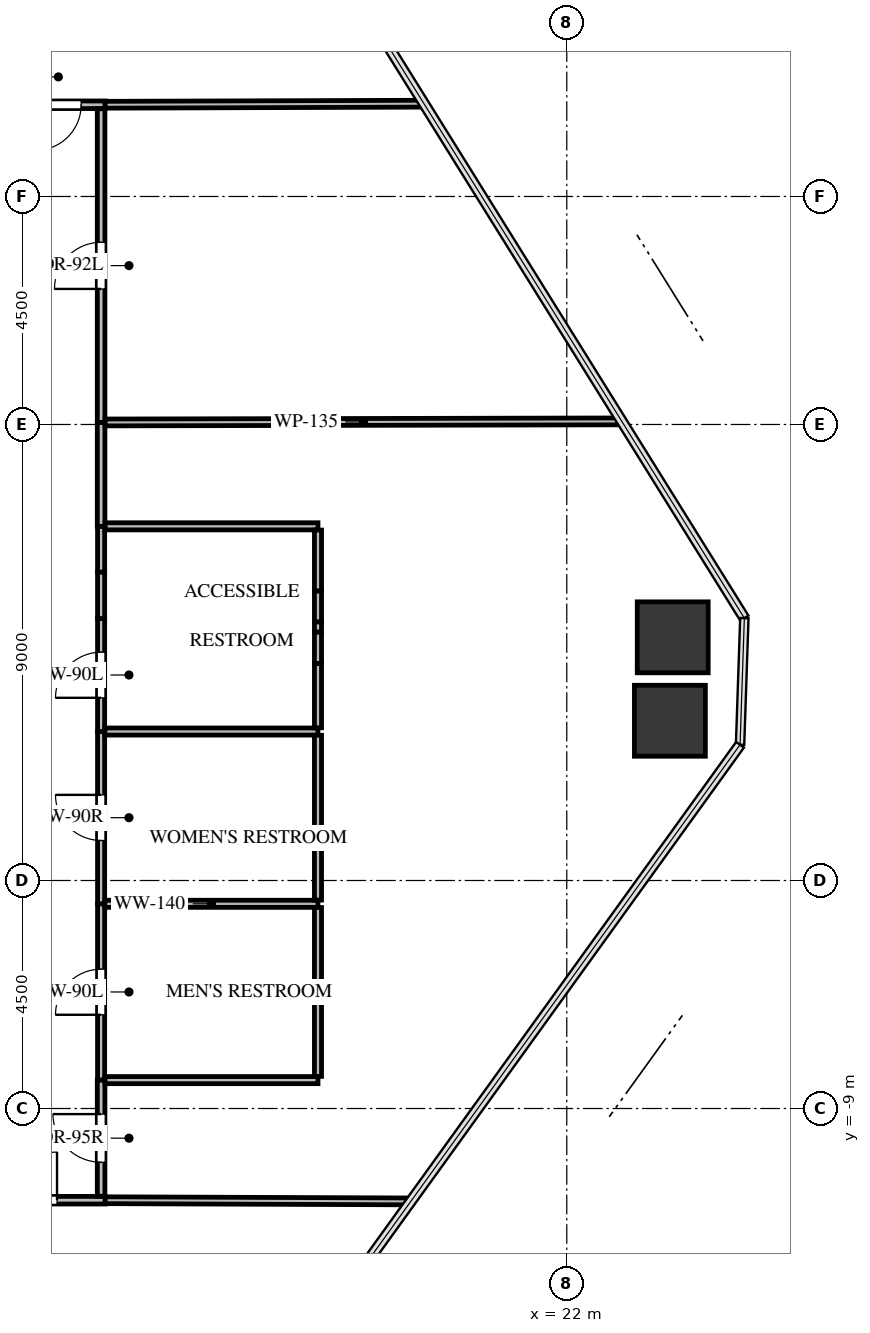
"""IFC4 building model, lengths in metres.
Left out: names, types, materials, properties, quantities, classifications, styles, units other than length and angle.
Written with IfcOpenShell. Run it as: python <this file> out.ifc"""

import sys

from ifc_helpers import new_model, si_unit, direction, frame, frame_2d, origin, origin_2d, place, context, subcontext, project, spatial, rectangle, extrude, source, transform, mapped, element, fill, save


model = new_model("IFC4")
c1 = context("Model", 3, precision=1e-05, world=origin(), true_north=direction((0.0, 1.0)))
c2 = subcontext(c1, "Body", "Model", "MODEL_VIEW")
j1 = project(units=[si_unit("LENGTHUNIT", "METRE"), si_unit("PLANEANGLEUNIT", "RADIAN")], contexts=[c1])
p1 = place(None, origin())
s1 = spatial("IfcSite", under=j1, at=p1, CompositionType="ELEMENT")
p2 = place(p1, origin())
s2 = spatial("IfcBuilding", under=s1, at=p2, CompositionType="ELEMENT")
p3 = place(p2, frame((0.0, 0.0, 42.3)))
s3 = spatial("IfcBuildingStorey", under=s2, at=p3, CompositionType="ELEMENT", Elevation=42.3)
m1 = source(origin(), c2, "Body", "SweptSolid", [
    extrude(rectangle(XDim=1.4, YDim=1.4, at=origin_2d()), origin(), (0.0, 0.0, 1.0), 3.3),
])
for number, where, z_axis, x_axis in (
    (1, (24.091, 0.3, -0.24), (0.0, 0.0, 1.0), (1.0, 0.0, 0.0)),
    (2, (24.035, -1.347, -0.24), (0.0, 0.0, 1.0), (1.0, 0.0, 0.0)),
):
    element("IfcColumn", number, at=place(p3, frame(where, z_axis=z_axis, x_axis=x_axis)), inside=s3, PredefinedType="COLUMN", context=c2, shape_type="MappedRepresentation", body=[
        mapped(m1, transform((0.0, 0.0, 0.0), x_axis=(1.0, 0.0, 0.0), y_axis=(0.0, 1.0, 0.0), z_axis=(0.0, 0.0, 1.0), scale=1.0)),
    ])
p4 = place(p3, frame((12.81, -8.44, 0.0), z_axis=(0.0, 0.0, 1.0), x_axis=(0.0, 1.0, 0.0)))
e3 = element("IfcWall", 3, at=p4, inside=s3, PredefinedType="PARTITIONING", context=c2, shape_type="SweptSolid", body=[
    extrude(rectangle(XDim=3.48, YDim=0.14, at=frame_2d((1.74, 0.0))), origin(), (0.0, 0.0, 1.0), 3.045),
])
p5 = place(p4, frame((1.29, 0.0, 0.0)))
e4 = element("IfcOpeningElement", 4, at=p5, cuts=e3, PredefinedType="OPENING", context=c2, shape_type="SweptSolid", body=[
    extrude(rectangle(XDim=0.9, YDim=2.05, at=frame_2d((0.45, 1.025))), frame((0.0, 0.08, 0.0), z_axis=(0.0, -1.0, 0.0), x_axis=(1.0, 0.0, 0.0)), (0.0, 0.0, 1.0), 0.16),
])
p6 = place(p3, frame((12.81, -4.96, 0.0), z_axis=(0.0, 0.0, 1.0), x_axis=(0.0, 1.0, 0.0)))
e5 = element("IfcWall", 5, at=p6, inside=s3, PredefinedType="PARTITIONING", context=c2, shape_type="SweptSolid", body=[
    extrude(rectangle(XDim=3.4, YDim=0.14, at=frame_2d((1.7, 0.0))), origin(), (0.0, 0.0, 1.0), 3.045),
])
p7 = place(p6, frame((1.25, 0.0, 0.0)))
e6 = element("IfcOpeningElement", 6, at=p7, cuts=e5, PredefinedType="OPENING", context=c2, shape_type="SweptSolid", body=[
    extrude(rectangle(XDim=0.9, YDim=2.05, at=frame_2d((0.45, 1.025))), frame((0.0, 0.08, 0.0), z_axis=(0.0, -1.0, 0.0), x_axis=(1.0, 0.0, 0.0)), (0.0, 0.0, 1.0), 0.16),
])
p8 = place(p3, frame((12.81, -1.56, 0.0), z_axis=(0.0, 0.0, 1.0), x_axis=(0.0, 1.0, 0.0)))
e7 = element("IfcWall", 7, at=p8, inside=s3, PredefinedType="PARTITIONING", context=c2, shape_type="SweptSolid", body=[
    extrude(rectangle(XDim=2.231, YDim=0.14, at=frame_2d((1.116, 0.0))), origin(), (0.0, 0.0, 1.0), 3.045),
])
p9 = place(p8, frame((0.666, 0.0, 0.0)))
e8 = element("IfcOpeningElement", 8, at=p9, cuts=e7, PredefinedType="OPENING", context=c2, shape_type="SweptSolid", body=[
    extrude(rectangle(XDim=0.9, YDim=2.05, at=frame_2d((0.45, 1.025))), frame((0.0, 0.08, 0.0), z_axis=(0.0, -1.0, 0.0), x_axis=(1.0, 0.0, 0.0)), (0.0, 0.0, 1.0), 0.16),
])
p10 = place(p3, frame((12.81, 1.585, 0.0), z_axis=(0.0, 0.0, 1.0), x_axis=(0.0, 1.0, 0.0)))
e9 = element("IfcWall", 9, at=p10, inside=s3, PredefinedType="PARTITIONING", context=c2, shape_type="SweptSolid", body=[
    extrude(rectangle(XDim=0.905, YDim=0.14, at=frame_2d((0.453, 0.0))), origin(), (0.0, 0.0, 1.0), 3.045),
])
p11 = place(p3, frame((12.81, 0.671, 0.0), z_axis=(0.0, 0.0, 1.0), x_axis=(0.0, 1.0, 0.0)))
e10 = element("IfcWall", 10, at=p11, inside=s3, PredefinedType="PARTITIONING", context=c2, shape_type="SweptSolid", body=[
    extrude(rectangle(XDim=0.914, YDim=0.14, at=frame_2d((0.457, 0.0))), origin(), (0.0, 0.0, 1.0), 2.13),
])
p12 = place(p3, frame((12.89, 10.81, 0.0), z_axis=(0.0, 0.0, 1.0), x_axis=(-1.0, 0.0, 0.0)))
e11 = element("IfcWall", 11, at=p12, inside=s3, PredefinedType="PARTITIONING", context=c2, shape_type="SweptSolid", body=[
    extrude(rectangle(XDim=1.847, YDim=0.15, at=frame_2d((0.924, 0.0))), origin(), (0.0, 0.0, 1.0), 3.045),
])
p13 = place(p12, frame((0.474, 0.0, 0.0)))
e12 = element("IfcOpeningElement", 12, at=p13, cuts=e11, PredefinedType="OPENING", context=c2, shape_type="SweptSolid", body=[
    extrude(rectangle(XDim=0.9, YDim=2.05, at=frame_2d((0.45, 1.025))), frame((0.0, 0.085, 0.0), z_axis=(0.0, -1.0, 0.0), x_axis=(1.0, 0.0, 0.0)), (0.0, 0.0, 1.0), 0.17),
])
p14 = place(p3, frame((10.04, -10.81, 0.0), z_axis=(0.0, 0.0, 1.0), x_axis=(1.0, 0.0, 0.0)))
e13 = element("IfcWall", 13, at=p14, inside=s3, PredefinedType="PARTITIONING", context=c2, shape_type="SweptSolid", body=[
    extrude(rectangle(XDim=2.85, YDim=0.15, at=frame_2d((1.425, 0.0))), origin(), (0.0, 0.0, 1.0), 3.045),
])
p15 = place(p14, frame((0.95, 0.0, 0.0)))
e14 = element("IfcOpeningElement", 14, at=p15, cuts=e13, PredefinedType="OPENING", context=c2, shape_type="SweptSolid", body=[
    extrude(rectangle(XDim=0.95, YDim=2.1, at=frame_2d((0.475, 1.05))), frame((0.0, 0.085, 0.0), z_axis=(0.0, -1.0, 0.0), x_axis=(1.0, 0.0, 0.0)), (0.0, 0.0, 1.0), 0.17),
])
p16 = place(p3, frame((12.81, -10.731, 0.0), z_axis=(0.0, 0.0, 1.0), x_axis=(0.0, 1.0, 0.0)))
e15 = element("IfcWall", 15, at=p16, inside=s3, PredefinedType="PARTITIONING", context=c2, shape_type="SweptSolid", body=[
    extrude(rectangle(XDim=2.291, YDim=0.15, at=frame_2d((1.146, 0.0))), origin(), (0.0, 0.0, 1.0), 3.045),
])
p17 = place(p16, frame((0.67, 0.0, 0.0)))
e16 = element("IfcOpeningElement", 16, at=p17, cuts=e15, PredefinedType="OPENING", context=c2, shape_type="SweptSolid", body=[
    extrude(rectangle(XDim=0.95, YDim=2.1, at=frame_2d((0.475, 1.05))), frame((0.0, 0.085, 0.0), z_axis=(0.0, -1.0, 0.0), x_axis=(1.0, 0.0, 0.0)), (0.0, 0.0, 1.0), 0.17),
])
p18 = place(p3, frame((12.81, 2.49, 0.0), z_axis=(0.0, 0.0, 1.0), x_axis=(0.0, 1.0, 0.0)))
e17 = element("IfcWall", 17, at=p18, inside=s3, PredefinedType="PARTITIONING", context=c2, shape_type="SweptSolid", body=[
    extrude(rectangle(XDim=2.05, YDim=0.15, at=frame_2d((1.025, 0.0))), origin(), (0.0, 0.0, 1.0), 3.045),
])
p19 = place(p3, frame((12.81, 4.54, 0.0), z_axis=(0.0, 0.0, 1.0), x_axis=(0.0, 1.0, 0.0)))
e18 = element("IfcWall", 18, at=p19, inside=s3, PredefinedType="PARTITIONING", context=c2, shape_type="SweptSolid", body=[
    extrude(rectangle(XDim=6.191, YDim=0.15, at=frame_2d((3.095, 0.0))), origin(), (0.0, 0.0, 1.0), 3.045),
])
p20 = place(p19, frame((2.635, 0.0, 0.0)))
e19 = element("IfcOpeningElement", 19, at=p20, cuts=e18, PredefinedType="OPENING", context=c2, shape_type="SweptSolid", body=[
    extrude(rectangle(XDim=0.92, YDim=2.1, at=frame_2d((0.46, 1.05))), frame((0.0, 0.085, 0.0), z_axis=(0.0, -1.0, 0.0), x_axis=(1.0, 0.0, 0.0)), (0.0, 0.0, 1.0), 0.17),
])
p21 = place(p3, frame((12.884, -4.96, 0.0), z_axis=(0.0, 0.0, 1.0), x_axis=(1.0, 0.0, 0.0)))
e20 = element("IfcWall", 20, at=p21, inside=s3, PredefinedType="PARTITIONING", context=c2, shape_type="SweptSolid", body=[
    extrude(rectangle(XDim=4.206, YDim=0.14, at=frame_2d((2.103, 0.0))), origin(), (0.0, 0.0, 1.0), 3.045),
])
p22 = place(p3, frame((17.09, -8.44, 0.0), z_axis=(0.0, 0.0, 1.0), x_axis=(-1.0, 0.0, 0.0)))
e21 = element("IfcWall", 21, at=p22, inside=s3, PredefinedType="PARTITIONING", context=c2, shape_type="SweptSolid", body=[
    extrude(rectangle(XDim=4.201, YDim=0.14, at=frame_2d((2.101, 0.0))), origin(), (0.0, 0.0, 1.0), 3.045),
])
p23 = place(p3, frame((17.09, -5.034, 0.0), z_axis=(0.0, 0.0, 1.0), x_axis=(0.0, -1.0, 0.0)))
e22 = element("IfcWall", 22, at=p23, inside=s3, PredefinedType="PARTITIONING", context=c2, shape_type="SweptSolid", body=[
    extrude(rectangle(XDim=3.332, YDim=0.14, at=frame_2d((1.666, 0.0))), origin(), (0.0, 0.0, 1.0), 3.045),
])
p24 = place(p3, frame((12.884, -1.56, 0.0), z_axis=(0.0, 0.0, 1.0), x_axis=(1.0, 0.0, 0.0)))
e23 = element("IfcWall", 23, at=p24, inside=s3, PredefinedType="PARTITIONING", context=c2, shape_type="SweptSolid", body=[
    extrude(rectangle(XDim=4.206, YDim=0.14, at=frame_2d((2.103, 0.0))), origin(), (0.0, 0.0, 1.0), 3.045),
])
p25 = place(p3, frame((17.09, -1.634, 0.0), z_axis=(0.0, 0.0, 1.0), x_axis=(0.0, -1.0, 0.0)))
e24 = element("IfcWall", 24, at=p25, inside=s3, PredefinedType="PARTITIONING", context=c2, shape_type="SweptSolid", body=[
    extrude(rectangle(XDim=3.252, YDim=0.14, at=frame_2d((1.626, 0.0))), origin(), (0.0, 0.0, 1.0), 3.045),
])
p26 = place(p3, frame((12.889, 2.49, 0.0), z_axis=(0.0, 0.0, 1.0), x_axis=(1.0, 0.0, 0.0)))
e25 = element("IfcWall", 25, at=p26, inside=s3, PredefinedType="PARTITIONING", context=c2, shape_type="SweptSolid", body=[
    extrude(rectangle(XDim=4.201, YDim=0.14, at=frame_2d((2.101, 0.0))), origin(), (0.0, 0.0, 1.0), 3.045),
])
p27 = place(p3, frame((17.09, 2.416, 0.0), z_axis=(0.0, 0.0, 1.0), x_axis=(0.0, -1.0, 0.0)))
e26 = element("IfcWall", 26, at=p27, inside=s3, PredefinedType="PARTITIONING", context=c2, shape_type="SweptSolid", body=[
    extrude(rectangle(XDim=1.204, YDim=0.14, at=frame_2d((0.602, 0.0))), origin(), (0.0, 0.0, 1.0), 3.045),
])
p28 = place(p3, frame((17.09, 0.606, 0.0), z_axis=(0.0, 0.0, 1.0), x_axis=(0.0, -1.0, 0.0)))
e27 = element("IfcWall", 27, at=p28, inside=s3, PredefinedType="PARTITIONING", context=c2, shape_type="SweptSolid", body=[
    extrude(rectangle(XDim=0.205, YDim=0.14, at=frame_2d((0.103, 0.0))), origin(), (0.0, 0.0, 1.0), 3.045),
])
p29 = place(p3, frame((17.09, -0.216, 0.0), z_axis=(0.0, 0.0, 1.0), x_axis=(0.0, -1.0, 0.0)))
e28 = element("IfcWall", 28, at=p29, inside=s3, PredefinedType="PARTITIONING", context=c2, shape_type="SweptSolid", body=[
    extrude(rectangle(XDim=1.27, YDim=0.14, at=frame_2d((0.635, 0.0))), origin(), (0.0, 0.0, 1.0), 3.045),
])
p30 = place(p3, frame((17.09, 1.212, 0.0), z_axis=(0.0, 0.0, 1.0), x_axis=(0.0, -1.0, 0.0)))
e29 = element("IfcWall", 29, at=p30, inside=s3, PredefinedType="PARTITIONING", context=c2, shape_type="SweptSolid", body=[
    extrude(rectangle(XDim=0.606, YDim=0.14, at=frame_2d((0.303, 0.0))), origin(), (0.0, 0.0, 1.0), 2.13),
])
p31 = place(p3, frame((17.09, 0.401, 0.0), z_axis=(0.0, 0.0, 1.0), x_axis=(0.0, -1.0, 0.0)))
e30 = element("IfcWall", 30, at=p31, inside=s3, PredefinedType="PARTITIONING", context=c2, shape_type="SweptSolid", body=[
    extrude(rectangle(XDim=0.617, YDim=0.14, at=frame_2d((0.309, 0.0))), origin(), (0.0, 0.0, 1.0), 2.13),
])
p32 = place(p3, frame((19.182, 10.831, 0.0), z_axis=(0.0, 0.0, 1.0), x_axis=(-0.999994432845, -0.003336806783, 0.0)))
e31 = element("IfcWall", 31, at=p32, inside=s3, PredefinedType="PARTITIONING", context=c2, shape_type="SweptSolid", body=[
    extrude(rectangle(XDim=6.292, YDim=0.135, at=frame_2d((3.146, 0.0))), origin(), (0.0, 0.0, 1.0), 2.38),
])
p33 = place(p3, frame((12.89, -10.81, 0.0), z_axis=(0.0, 0.0, 1.0), x_axis=(0.999992607823, -0.003845035728, 0.0)))
e32 = element("IfcWall", 32, at=p33, inside=s3, PredefinedType="PARTITIONING", context=c2, shape_type="SweptSolid", body=[
    extrude(rectangle(XDim=6.032, YDim=0.135, at=frame_2d((3.016, 0.0))), origin(), (0.0, 0.0, 1.0), 2.38),
])
p34 = place(p3, frame((12.889, 4.54, 0.0), z_axis=(0.0, 0.0, 1.0), x_axis=(0.99999792939, 0.002034997821, 0.0)))
e33 = element("IfcWall", 33, at=p34, inside=s3, PredefinedType="PARTITIONING", context=c2, shape_type="SweptSolid", body=[
    extrude(rectangle(XDim=10.198, YDim=0.135, at=frame_2d((5.099, 0.0))), origin(), (0.0, 0.0, 1.0), 2.38),
])
m2 = source(origin(), c2, "Body", "SweptSolid", [
    extrude(rectangle(XDim=0.9, YDim=2.05, at=frame_2d((0.45, 1.025))), frame((0.0, 0.025, 0.0), z_axis=(0.0, -1.0, 0.0), x_axis=(1.0, 0.0, 0.0)), (0.0, 0.0, 1.0), 0.05),
])
p35 = place(p5, origin())
e34 = element("IfcDoor", 34, at=p35, inside=s3, OperationType="SINGLE_SWING_LEFT", PredefinedType="DOOR", context=c2, shape_type="MappedRepresentation", body=[
    mapped(m2, transform((0.0, 0.0, 0.0), x_axis=(1.0, 0.0, 0.0), y_axis=(0.0, 1.0, 0.0), z_axis=(0.0, 0.0, 1.0), scale=1.0)),
])
fill(e4, e34)
m3 = source(origin(), c2, "Body", "SweptSolid", [
    extrude(rectangle(XDim=0.9, YDim=2.05, at=frame_2d((0.45, 1.025))), frame((0.0, 0.025, 0.0), z_axis=(0.0, -1.0, 0.0), x_axis=(1.0, 0.0, 0.0)), (0.0, 0.0, 1.0), 0.05),
])
p36 = place(p7, origin())
e35 = element("IfcDoor", 35, at=p36, inside=s3, OperationType="SINGLE_SWING_RIGHT", PredefinedType="DOOR", context=c2, shape_type="MappedRepresentation", body=[
    mapped(m3, transform((0.0, 0.0, 0.0), x_axis=(1.0, 0.0, 0.0), y_axis=(0.0, 1.0, 0.0), z_axis=(0.0, 0.0, 1.0), scale=1.0)),
])
fill(e6, e35)
p37 = place(p9, origin())
e36 = element("IfcDoor", 36, at=p37, inside=s3, OperationType="SINGLE_SWING_LEFT", PredefinedType="DOOR", context=c2, shape_type="MappedRepresentation", body=[
    mapped(m2, transform((0.0, 0.0, 0.0), x_axis=(1.0, 0.0, 0.0), y_axis=(0.0, 1.0, 0.0), z_axis=(0.0, 0.0, 1.0), scale=1.0)),
])
fill(e8, e36)
p38 = place(p13, origin())
e37 = element("IfcDoor", 37, at=p38, inside=s3, OperationType="SINGLE_SWING_RIGHT", PredefinedType="DOOR", context=c2, shape_type="MappedRepresentation", body=[
    mapped(m3, transform((0.0, 0.0, 0.0), x_axis=(1.0, 0.0, 0.0), y_axis=(0.0, 1.0, 0.0), z_axis=(0.0, 0.0, 1.0), scale=1.0)),
])
fill(e12, e37)
m4 = source(origin(), c2, "Body", "SweptSolid", [
    extrude(rectangle(XDim=0.95, YDim=2.1, at=frame_2d((0.475, 1.05))), frame((0.0, 0.025, 0.0), z_axis=(0.0, -1.0, 0.0), x_axis=(1.0, 0.0, 0.0)), (0.0, 0.0, 1.0), 0.05),
])
p39 = place(p15, origin())
e38 = element("IfcDoor", 38, at=p39, inside=s3, OperationType="SINGLE_SWING_RIGHT", PredefinedType="DOOR", context=c2, shape_type="MappedRepresentation", body=[
    mapped(m4, transform((0.0, 0.0, 0.0), x_axis=(1.0, 0.0, 0.0), y_axis=(0.0, 1.0, 0.0), z_axis=(0.0, 0.0, 1.0), scale=1.0)),
])
fill(e14, e38)
p40 = place(p17, origin())
e39 = element("IfcDoor", 39, at=p40, inside=s3, OperationType="SINGLE_SWING_RIGHT", PredefinedType="DOOR", context=c2, shape_type="MappedRepresentation", body=[
    mapped(m4, transform((0.0, 0.0, 0.0), x_axis=(1.0, 0.0, 0.0), y_axis=(0.0, 1.0, 0.0), z_axis=(0.0, 0.0, 1.0), scale=1.0)),
])
fill(e16, e39)
m5 = source(origin(), c2, "Body", "SweptSolid", [
    extrude(rectangle(XDim=0.92, YDim=2.1, at=frame_2d((0.46, 1.05))), frame((0.0, 0.025, 0.0), z_axis=(0.0, -1.0, 0.0), x_axis=(1.0, 0.0, 0.0)), (0.0, 0.0, 1.0), 0.05),
])
p41 = place(p20, origin())
e40 = element("IfcDoor", 40, at=p41, inside=s3, OperationType="SINGLE_SWING_LEFT", PredefinedType="DOOR", context=c2, shape_type="MappedRepresentation", body=[
    mapped(m5, transform((0.0, 0.0, 0.0), x_axis=(1.0, 0.0, 0.0), y_axis=(0.0, 1.0, 0.0), z_axis=(0.0, 0.0, 1.0), scale=1.0)),
])
fill(e19, e40)
save(model, sys.argv[1])
